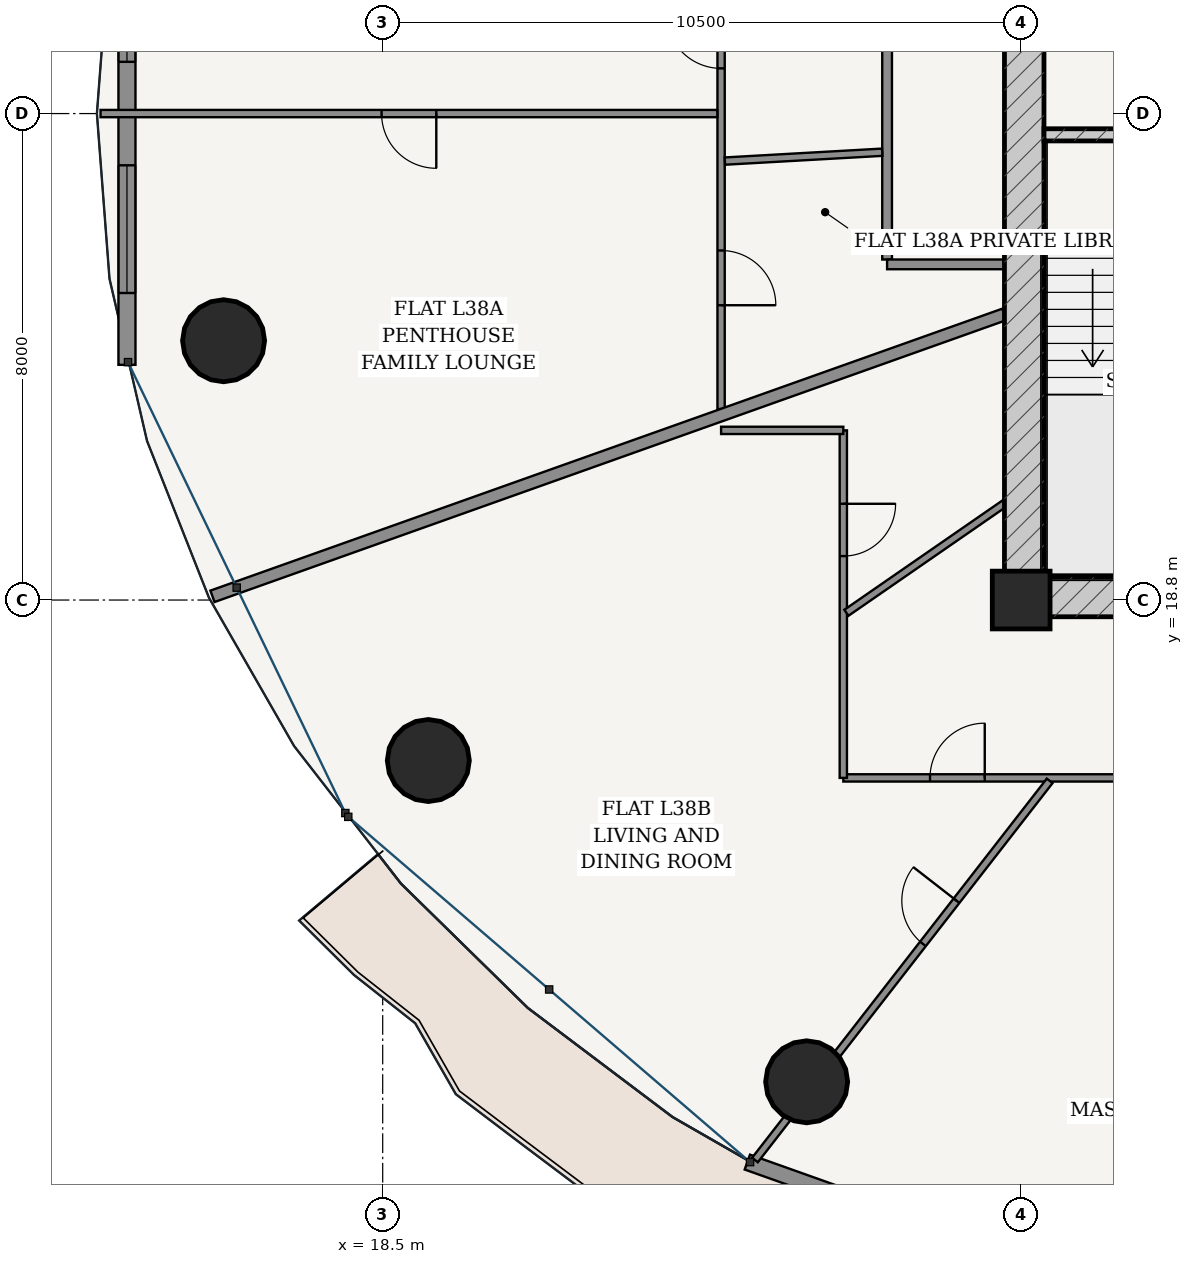
"""IFC4 building model, lengths in metres.
Left out: names, types, materials, properties, quantities, classifications, styles, units other than length and angle.
Written with IfcOpenShell. Run it as: python <this file> out.ifc"""

import sys

from ifc_helpers import new_model, si_unit, direction, frame, frame_2d, origin, origin_2d, place, context, subcontext, project, spatial, rectangle, hollow_circle, extrude, source, transform, mapped, element, fill, save


model = new_model("IFC4")
c1 = context("Model", 3, precision=1e-05, world=origin(), true_north=direction((-0.2419218956, 0.970295726276)))
c2 = subcontext(c1, "Body", "Model", "MODEL_VIEW")
j1 = project(units=[si_unit("LENGTHUNIT", "METRE"), si_unit("PLANEANGLEUNIT", "RADIAN")], contexts=[c1])
p1 = place(None, origin())
s1 = spatial("IfcSite", under=j1, at=p1, CompositionType="ELEMENT")
p2 = place(p1, origin())
s2 = spatial("IfcBuilding", under=s1, at=p2, CompositionType="ELEMENT")
p3 = place(p2, frame((0.0, 0.0, 146.2)))
s3 = spatial("IfcBuildingStorey", under=s2, at=p3, CompositionType="ELEMENT", Elevation=146.2)
p4 = place(p3, frame((29.0, 18.8, 0.0), z_axis=(0.0, 0.0, 1.0), x_axis=(1.0, 0.0, 0.0)))
e1 = element("IfcColumn", 1, at=p4, inside=s3, PredefinedType="COLUMN", context=c2, shape_type="SweptSolid", body=[
    extrude(rectangle(XDim=0.95, YDim=0.95, at=origin_2d()), origin(), (0.0, 0.0, 1.0), 3.6),
])
p5 = place(p3, frame((28.725, 18.85, 0.0), z_axis=(0.0, 0.0, 1.0), x_axis=(1.0, 0.0, 0.0)))
e2 = element("IfcWall", 2, at=p5, inside=s3, PredefinedType="SHEAR", context=c2, shape_type="SweptSolid", body=[
    extrude(rectangle(XDim=18.55, YDim=0.65, at=frame_2d((9.275, 0.0))), origin(), (0.0, 0.0, 1.0), 3.33),
])
p6 = place(p5, frame((7.51, 0.0, 0.0)))
e3 = element("IfcOpeningElement", 3, at=p6, cuts=e2, PredefinedType="OPENING", context=c2, shape_type="SweptSolid", body=[
    extrude(rectangle(XDim=0.85, YDim=2.1, at=frame_2d((0.425, 1.05))), frame((0.0, 0.335, 0.0), z_axis=(0.0, -1.0, 0.0), x_axis=(1.0, 0.0, 0.0)), (0.0, 0.0, 1.0), 0.67),
])
p7 = place(p5, frame((10.59, 0.0, 0.0)))
e4 = element("IfcOpeningElement", 4, at=p7, cuts=e2, PredefinedType="OPENING", context=c2, shape_type="SweptSolid", body=[
    extrude(rectangle(XDim=0.85, YDim=2.1, at=frame_2d((0.425, 1.05))), frame((0.0, 0.335, 0.0), z_axis=(0.0, -1.0, 0.0), x_axis=(1.0, 0.0, 0.0)), (0.0, 0.0, 1.0), 0.67),
])
p8 = place(p3, frame((29.05, 19.175, 0.0), z_axis=(0.0, 0.0, 1.0), x_axis=(0.0, 1.0, 0.0)))
e5 = element("IfcWall", 5, at=p8, inside=s3, PredefinedType="SHEAR", context=c2, shape_type="SweptSolid", body=[
    extrude(rectangle(XDim=15.25, YDim=0.65, at=frame_2d((7.625, 0.0))), origin(), (0.0, 0.0, 1.0), 3.33),
])
p9 = place(p8, frame((9.875, 0.0, 0.0)))
e6 = element("IfcOpeningElement", 6, at=p9, cuts=e5, PredefinedType="OPENING", context=c2, shape_type="SweptSolid", body=[
    extrude(rectangle(XDim=1.5, YDim=2.2, at=frame_2d((0.75, 1.1))), frame((0.0, 0.335, 0.0), z_axis=(0.0, -1.0, 0.0), x_axis=(1.0, 0.0, 0.0)), (0.0, 0.0, 1.0), 0.67),
])
p10 = place(p3, frame((29.375, 26.45, 0.0), z_axis=(0.0, 0.0, 1.0), x_axis=(1.0, 0.0, 0.0)))
e7 = element("IfcWall", 7, at=p10, inside=s3, PredefinedType="SOLIDWALL", context=c2, shape_type="SweptSolid", body=[
    extrude(rectangle(XDim=3.32, YDim=0.2, at=frame_2d((1.66, 0.0))), origin(), (0.0, 0.0, 1.0), 3.33),
])
p11 = place(p10, frame((1.185, 0.0, 0.0)))
e8 = element("IfcOpeningElement", 8, at=p11, cuts=e7, PredefinedType="OPENING", context=c2, shape_type="SweptSolid", body=[
    extrude(rectangle(XDim=0.95, YDim=2.15, at=frame_2d((0.475, 1.075))), frame((0.0, 0.11, 0.0), z_axis=(0.0, -1.0, 0.0), x_axis=(1.0, 0.0, 0.0)), (0.0, 0.0, 1.0), 0.22),
])
for number, where, z_axis, x_axis in (
    (9, (15.883, 23.064, 0.0), (0.0, 0.0, 1.0), (1.0, 0.0, 0.0)),
    (10, (19.25, 16.161, 0.0), (0.0, 0.0, 1.0), (1.0, 0.0, 0.0)),
    (11, (25.472, 10.877, 0.0), (0.0, 0.0, 1.0), (1.0, 0.0, 0.0)),
):
    element("IfcColumn", number, at=place(p3, frame(where, z_axis=z_axis, x_axis=x_axis)), inside=s3, PredefinedType="COLUMN", context=c2, shape_type="SweptSolid", body=[
        extrude(hollow_circle(Radius=0.675, WallThickness=0.042, at=origin_2d()), origin(), (0.0, 0.0, 1.0), 3.6),
    ])
p12 = place(p3, frame((14.294, 30.932, 0.0), z_axis=(0.0, 0.0, 1.0), x_axis=(0.0, -1.0, 0.0)))
e12 = element("IfcWall", 12, at=p12, inside=s3, PredefinedType="SOLIDWALL", context=c2, shape_type="SweptSolid", body=[
    extrude(rectangle(XDim=8.264, YDim=0.28, at=frame_2d((4.132, 0.0))), origin(), (0.0, 0.0, 1.0), 3.33),
])
p13 = place(p12, frame((1.181, 0.0, 0.85)))
e13 = element("IfcOpeningElement", 13, at=p13, cuts=e12, PredefinedType="OPENING", context=c2, shape_type="SweptSolid", body=[
    extrude(rectangle(XDim=2.1, YDim=1.95, at=frame_2d((1.05, 0.975))), frame((0.0, 0.15, 0.0), z_axis=(0.0, -1.0, 0.0), x_axis=(1.0, 0.0, 0.0)), (0.0, 0.0, 1.0), 0.3),
])
p14 = place(p12, frame((4.983, 0.0, 0.85)))
e14 = element("IfcOpeningElement", 14, at=p14, cuts=e12, PredefinedType="OPENING", context=c2, shape_type="SweptSolid", body=[
    extrude(rectangle(XDim=2.1, YDim=1.95, at=frame_2d((1.05, 0.975))), frame((0.0, 0.15, 0.0), z_axis=(0.0, -1.0, 0.0), x_axis=(1.0, 0.0, 0.0)), (0.0, 0.0, 1.0), 0.3),
])
p15 = place(p3, frame((24.497, 9.557, 0.0), z_axis=(0.0, 0.0, 1.0), x_axis=(0.942103604331, -0.335321932934, 0.0)))
e15 = element("IfcWall", 15, at=p15, inside=s3, PredefinedType="SOLIDWALL", context=c2, shape_type="SweptSolid", body=[
    extrude(rectangle(XDim=9.408, YDim=0.26, at=frame_2d((4.704, 0.0))), origin(), (0.0, 0.0, 1.0), 3.33),
])
p16 = place(p15, frame((4.029, 0.0, 0.0)))
e16 = element("IfcOpeningElement", 16, at=p16, cuts=e15, PredefinedType="OPENING", context=c2, shape_type="SweptSolid", body=[
    extrude(rectangle(XDim=1.35, YDim=2.2, at=frame_2d((0.675, 1.1))), frame((0.0, 0.14, 0.0), z_axis=(0.0, -1.0, 0.0), x_axis=(1.0, 0.0, 0.0)), (0.0, 0.0, 1.0), 0.28),
])
p17 = place(p3, frame((26.795, 24.4, 0.0), z_axis=(0.0, 0.0, 1.0), x_axis=(0.0, 1.0, 0.0)))
e17 = element("IfcWall", 17, at=p17, inside=s3, PredefinedType="PARTITIONING", context=c2, shape_type="SweptSolid", body=[
    extrude(rectangle(XDim=10.675, YDim=0.16, at=frame_2d((5.337, 0.0))), origin(), (0.0, 0.0, 1.0), 2.776),
])
p18 = place(p17, frame((6.702, 0.0, 0.0)))
e18 = element("IfcOpeningElement", 18, at=p18, cuts=e17, PredefinedType="OPENING", context=c2, shape_type="SweptSolid", body=[
    extrude(rectangle(XDim=0.98, YDim=2.2, at=frame_2d((0.49, 1.1))), frame((0.0, 0.09, 0.0), z_axis=(0.0, -1.0, 0.0), x_axis=(1.0, 0.0, 0.0)), (0.0, 0.0, 1.0), 0.18),
])
p19 = place(p3, frame((26.795, 24.32, 0.0), z_axis=(0.0, 0.0, 1.0), x_axis=(1.0, 0.0, 0.0)))
e19 = element("IfcWall", 19, at=p19, inside=s3, PredefinedType="PARTITIONING", context=c2, shape_type="SweptSolid", body=[
    extrude(rectangle(XDim=1.93, YDim=0.16, at=frame_2d((0.965, 0.0))), origin(), (0.0, 0.0, 1.0), 3.33),
])
p20 = place(p3, frame((24.065, 21.941, 0.0), z_axis=(0.0, 0.0, 1.0), x_axis=(0.0, 1.0, 0.0)))
e20 = element("IfcWall", 20, at=p20, inside=s3, PredefinedType="PARTITIONING", context=c2, shape_type="SweptSolid", body=[
    extrude(rectangle(XDim=15.944, YDim=0.12, at=frame_2d((7.972, 0.0))), origin(), (0.0, 0.0, 1.0), 2.776),
])
p21 = place(p20, frame((5.602, 0.0, 0.0)))
e21 = element("IfcOpeningElement", 21, at=p21, cuts=e20, PredefinedType="OPENING", context=c2, shape_type="SweptSolid", body=[
    extrude(rectangle(XDim=0.9, YDim=2.15, at=frame_2d((0.45, 1.075))), frame((0.0, 0.07, 0.0), z_axis=(0.0, -1.0, 0.0), x_axis=(1.0, 0.0, 0.0)), (0.0, 0.0, 1.0), 0.14),
])
p22 = place(p20, frame((1.707, 0.0, 0.0)))
e22 = element("IfcOpeningElement", 22, at=p22, cuts=e20, PredefinedType="OPENING", context=c2, shape_type="SweptSolid", body=[
    extrude(rectangle(XDim=0.9, YDim=2.15, at=frame_2d((0.45, 1.075))), frame((0.0, 0.07, 0.0), z_axis=(0.0, -1.0, 0.0), x_axis=(1.0, 0.0, 0.0)), (0.0, 0.0, 1.0), 0.14),
])
p23 = place(p20, frame((11.402, 0.0, 0.0)))
e23 = element("IfcOpeningElement", 23, at=p23, cuts=e20, PredefinedType="OPENING", context=c2, shape_type="SweptSolid", body=[
    extrude(rectangle(XDim=0.9, YDim=2.15, at=frame_2d((0.45, 1.075))), frame((0.0, 0.07, 0.0), z_axis=(0.0, -1.0, 0.0), x_axis=(1.0, 0.0, 0.0)), (0.0, 0.0, 1.0), 0.14),
])
p24 = place(p3, frame((24.003, 26.8, 0.0), z_axis=(0.0, 0.0, 1.0), x_axis=(-1.0, 0.0, 0.0)))
e24 = element("IfcWall", 24, at=p24, inside=s3, PredefinedType="PARTITIONING", context=c2, shape_type="SweptSolid", body=[
    extrude(rectangle(XDim=10.143, YDim=0.12, at=frame_2d((5.071, 0.0))), origin(), (0.0, 0.0, 1.0), 2.846),
])
p25 = place(p24, frame((4.622, 0.0, 0.0)))
e25 = element("IfcOpeningElement", 25, at=p25, cuts=e24, PredefinedType="OPENING", context=c2, shape_type="SweptSolid", body=[
    extrude(rectangle(XDim=0.9, YDim=2.15, at=frame_2d((0.45, 1.075))), frame((0.0, 0.07, 0.0), z_axis=(0.0, -1.0, 0.0), x_axis=(1.0, 0.0, 0.0)), (0.0, 0.0, 1.0), 0.14),
])
p26 = place(p3, frame((26.715, 26.164, 0.0), z_axis=(0.0, 0.0, 1.0), x_axis=(-0.998418047295, -0.056226353574, 0.0)))
e26 = element("IfcWall", 26, at=p26, inside=s3, PredefinedType="PARTITIONING", context=c2, shape_type="SweptSolid", body=[
    extrude(rectangle(XDim=2.592, YDim=0.12, at=frame_2d((1.296, 0.0))), origin(), (0.0, 0.0, 1.0), 3.33),
])
p27 = place(p3, frame((28.723, 23.497, 0.0), z_axis=(0.0, 0.0, 1.0), x_axis=(-0.942077095572, -0.335396401292, 0.0)))
e27 = element("IfcWall", 27, at=p27, inside=s3, PredefinedType="PARTITIONING", context=c2, shape_type="SweptSolid", body=[
    extrude(rectangle(XDim=13.823, YDim=0.2, at=frame_2d((6.912, 0.0))), origin(), (0.0, 0.0, 1.0), 2.846),
])
p28 = place(p3, frame((31.59, 15.875, 0.0), z_axis=(0.0, 0.0, 1.0), x_axis=(-1.0, 0.0, 0.0)))
e28 = element("IfcWall", 28, at=p28, inside=s3, PredefinedType="PARTITIONING", context=c2, shape_type="SweptSolid", body=[
    extrude(rectangle(XDim=5.515, YDim=0.12, at=frame_2d((2.758, 0.0))), origin(), (0.0, 0.0, 1.0), 2.776),
])
p29 = place(p28, frame((3.189, 0.0, 0.0)))
e29 = element("IfcOpeningElement", 29, at=p29, cuts=e28, PredefinedType="OPENING", context=c2, shape_type="SweptSolid", body=[
    extrude(rectangle(XDim=0.9, YDim=2.15, at=frame_2d((0.45, 1.075))), frame((0.0, 0.07, 0.0), z_axis=(0.0, -1.0, 0.0), x_axis=(1.0, 0.0, 0.0)), (0.0, 0.0, 1.0), 0.14),
])
p30 = place(p3, frame((26.075, 15.875, 0.0), z_axis=(0.0, 0.0, 1.0), x_axis=(0.0, 1.0, 0.0)))
e30 = element("IfcWall", 30, at=p30, inside=s3, PredefinedType="PARTITIONING", context=c2, shape_type="SweptSolid", body=[
    extrude(rectangle(XDim=5.715, YDim=0.12, at=frame_2d((2.857, 0.0))), origin(), (0.0, 0.0, 1.0), 2.776),
])
p31 = place(p30, frame((3.648, 0.0, 0.0)))
e31 = element("IfcOpeningElement", 31, at=p31, cuts=e30, PredefinedType="OPENING", context=c2, shape_type="SweptSolid", body=[
    extrude(rectangle(XDim=0.86, YDim=2.15, at=frame_2d((0.43, 1.075))), frame((0.0, 0.07, 0.0), z_axis=(0.0, -1.0, 0.0), x_axis=(1.0, 0.0, 0.0)), (0.0, 0.0, 1.0), 0.14),
])
p32 = place(p3, frame((26.075, 21.59, 0.0), z_axis=(0.0, 0.0, 1.0), x_axis=(-1.0, 0.0, 0.0)))
e32 = element("IfcWall", 32, at=p32, inside=s3, PredefinedType="PARTITIONING", context=c2, shape_type="SweptSolid", body=[
    extrude(rectangle(XDim=2.01, YDim=0.12, at=frame_2d((1.005, 0.0))), origin(), (0.0, 0.0, 1.0), 3.33),
])
p33 = place(p3, frame((29.469, 15.826, 0.0), z_axis=(0.0, 0.0, 1.0), x_axis=(-0.61373942367, -0.789508657225, 0.0)))
e33 = element("IfcWall", 33, at=p33, inside=s3, PredefinedType="PARTITIONING", context=c2, shape_type="SweptSolid", body=[
    extrude(rectangle(XDim=7.898, YDim=0.12, at=frame_2d((3.949, 0.0))), origin(), (0.0, 0.0, 1.0), 2.776),
])
p34 = place(p33, frame((2.496, 0.0, 0.0)))
e34 = element("IfcOpeningElement", 34, at=p34, cuts=e33, PredefinedType="OPENING", context=c2, shape_type="SweptSolid", body=[
    extrude(rectangle(XDim=0.9, YDim=2.15, at=frame_2d((0.45, 1.075))), frame((0.0, 0.07, 0.0), z_axis=(0.0, -1.0, 0.0), x_axis=(1.0, 0.0, 0.0)), (0.0, 0.0, 1.0), 0.14),
])
p35 = place(p3, frame((28.723, 20.386, 0.0), z_axis=(0.0, 0.0, 1.0), x_axis=(-0.822570551556, -0.568663070467, 0.0)))
e35 = element("IfcWall", 35, at=p35, inside=s3, PredefinedType="PARTITIONING", context=c2, shape_type="SweptSolid", body=[
    extrude(rectangle(XDim=3.158, YDim=0.12, at=frame_2d((1.579, 0.0))), origin(), (0.0, 0.0, 1.0), 3.33),
])
m1 = source(origin(), c2, "Body", "SweptSolid", [
    extrude(rectangle(XDim=2.1, YDim=1.95, at=frame_2d((1.05, 0.975))), frame((0.0, 0.03, 0.0), z_axis=(0.0, -1.0, 0.0), x_axis=(1.0, 0.0, 0.0)), (0.0, 0.0, 1.0), 0.06),
])
p36 = place(p13, origin())
e36 = element("IfcWindow", 36, at=p36, inside=s3, PartitioningType="SINGLE_PANEL", PredefinedType="WINDOW", context=c2, shape_type="MappedRepresentation", body=[
    mapped(m1, transform((0.0, 0.0, 0.0), scale=1.0)),
])
fill(e13, e36)
p37 = place(p14, origin())
e37 = element("IfcWindow", 37, at=p37, inside=s3, PartitioningType="SINGLE_PANEL", PredefinedType="WINDOW", context=c2, shape_type="MappedRepresentation", body=[
    mapped(m1, transform((0.0, 0.0, 0.0), scale=1.0)),
])
fill(e14, e37)
m2 = source(origin(), c2, "Body", "SweptSolid", [
    extrude(rectangle(XDim=0.9, YDim=2.15, at=frame_2d((0.45, 1.075))), frame((0.0, 0.025, 0.0), z_axis=(0.0, -1.0, 0.0), x_axis=(1.0, 0.0, 0.0)), (0.0, 0.0, 1.0), 0.05),
])
p38 = place(p21, origin())
e38 = element("IfcDoor", 38, at=p38, inside=s3, OperationType="SINGLE_SWING_RIGHT", PredefinedType="DOOR", context=c2, shape_type="MappedRepresentation", body=[
    mapped(m2, transform((0.0, 0.0, 0.0), scale=1.0)),
])
fill(e21, e38)
p39 = place(p25, origin())
e39 = element("IfcDoor", 39, at=p39, inside=s3, OperationType="SINGLE_SWING_LEFT", PredefinedType="DOOR", context=c2, shape_type="MappedRepresentation", body=[
    mapped(m2, transform((0.0, 0.0, 0.0), scale=1.0)),
])
fill(e25, e39)
p40 = place(p22, frame((0.9, 0.0, 0.0), z_axis=(0.0, 0.0, 1.0), x_axis=(-1.0, 0.0, 0.0)))
e40 = element("IfcDoor", 40, at=p40, inside=s3, OperationType="SINGLE_SWING_RIGHT", PredefinedType="DOOR", context=c2, shape_type="MappedRepresentation", body=[
    mapped(m2, transform((0.0, 0.0, 0.0), scale=1.0)),
])
fill(e22, e40)
p41 = place(p34, frame((0.9, 0.0, 0.0), z_axis=(0.0, 0.0, 1.0), x_axis=(-1.0, 0.0, 0.0)))
e41 = element("IfcDoor", 41, at=p41, inside=s3, OperationType="SINGLE_SWING_RIGHT", PredefinedType="DOOR", context=c2, shape_type="MappedRepresentation", body=[
    mapped(m2, transform((0.0, 0.0, 0.0), scale=1.0)),
])
fill(e34, e41)
m3 = source(origin(), c2, "Body", "SweptSolid", [
    extrude(rectangle(XDim=0.86, YDim=2.15, at=frame_2d((0.43, 1.075))), frame((0.0, 0.025, 0.0), z_axis=(0.0, -1.0, 0.0), x_axis=(1.0, 0.0, 0.0)), (0.0, 0.0, 1.0), 0.05),
])
p42 = place(p31, frame((0.86, 0.0, 0.0), z_axis=(0.0, 0.0, 1.0), x_axis=(-1.0, 0.0, 0.0)))
e42 = element("IfcDoor", 42, at=p42, inside=s3, OperationType="SINGLE_SWING_LEFT", PredefinedType="DOOR", context=c2, shape_type="MappedRepresentation", body=[
    mapped(m3, transform((0.0, 0.0, 0.0), scale=1.0)),
])
fill(e31, e42)
p43 = place(p29, frame((0.9, 0.0, 0.0), z_axis=(0.0, 0.0, 1.0), x_axis=(-1.0, 0.0, 0.0)))
e43 = element("IfcDoor", 43, at=p43, inside=s3, OperationType="SINGLE_SWING_RIGHT", PredefinedType="DOOR", context=c2, shape_type="MappedRepresentation", body=[
    mapped(m2, transform((0.0, 0.0, 0.0), scale=1.0)),
])
fill(e29, e43)
save(model, sys.argv[1])
